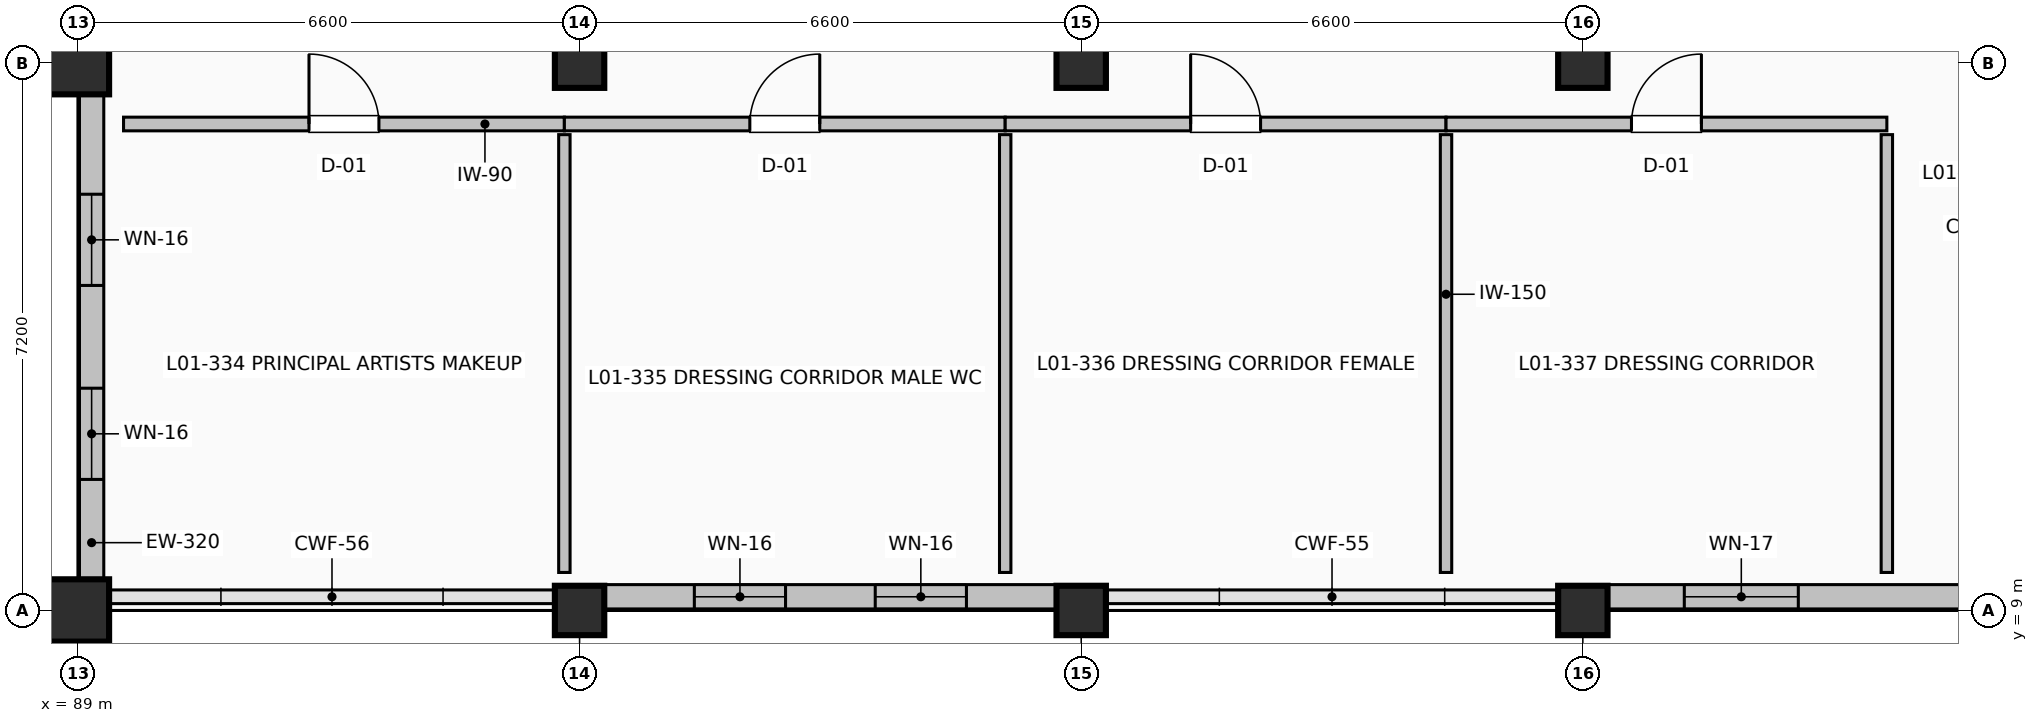
"""IFC4 building model, lengths in metres.
Left out: names, types, materials, properties, quantities, classifications, styles, units other than length and angle.
Written with IfcOpenShell. Run it as: python <this file> out.ifc"""

import sys

from ifc_helpers import new_model, si_unit, direction, frame, frame_2d, origin, origin_2d, place, context, subcontext, project, spatial, rectangle, extrude, element, fill, save


model = new_model("IFC4")
c1 = context("Model", 3, precision=1e-05, world=origin(), true_north=direction((0.0, 1.0)))
c2 = subcontext(c1, "Body", "Model", "MODEL_VIEW")
j1 = project(units=[si_unit("LENGTHUNIT", "METRE"), si_unit("PLANEANGLEUNIT", "RADIAN")], contexts=[c1])
p1 = place(None, origin())
s1 = spatial("IfcSite", under=j1, at=p1, CompositionType="ELEMENT")
p2 = place(p1, origin())
s2 = spatial("IfcBuilding", under=s1, at=p2, CompositionType="ELEMENT")
p3 = place(p2, frame((0.0, 0.0, 5.4)))
s3 = spatial("IfcBuildingStorey", under=s2, at=p3, CompositionType="ELEMENT", Elevation=5.4)
for number, where, z_axis, x_axis in (
    (1, (89.0, 9.0, 0.0), (0.0, 0.0, 1.0), (1.0, 0.0, 0.0)),
    (2, (89.0, 16.2, 0.0), (0.0, 0.0, 1.0), (1.0, 0.0, 0.0)),
):
    element("IfcColumn", number, at=place(p3, frame(where, z_axis=z_axis, x_axis=x_axis)), inside=s3, PredefinedType="COLUMN", context=c2, shape_type="SweptSolid", body=[
        extrude(rectangle(XDim=0.82, YDim=0.82, at=origin_2d()), origin(), (0.0, 0.0, 1.0), 4.8),
    ])
for number, where, z_axis, x_axis in (
    (3, (95.6, 9.0, 0.0), (0.0, 0.0, 1.0), (1.0, 0.0, 0.0)),
    (4, (95.6, 16.2, 0.0), (0.0, 0.0, 1.0), (1.0, 0.0, 0.0)),
    (5, (102.2, 9.0, 0.0), (0.0, 0.0, 1.0), (1.0, 0.0, 0.0)),
    (6, (102.2, 16.2, 0.0), (0.0, 0.0, 1.0), (1.0, 0.0, 0.0)),
    (7, (108.8, 9.0, 0.0), (0.0, 0.0, 1.0), (1.0, 0.0, 0.0)),
    (8, (108.8, 16.2, 0.0), (0.0, 0.0, 1.0), (1.0, 0.0, 0.0)),
):
    element("IfcColumn", number, at=place(p3, frame(where, z_axis=z_axis, x_axis=x_axis)), inside=s3, PredefinedType="COLUMN", context=c2, shape_type="SweptSolid", body=[
        extrude(rectangle(XDim=0.65, YDim=0.65, at=origin_2d()), origin(), (0.0, 0.0, 1.0), 4.8),
    ])
p4 = place(p3, frame((89.18, 9.41, 0.0), z_axis=(0.0, 0.0, 1.0), x_axis=(0.0, 1.0, 0.0)))
e9 = element("IfcWall", 9, at=p4, inside=s3, PredefinedType="SOLIDWALL", context=c2, shape_type="SweptSolid", body=[
    extrude(rectangle(XDim=6.38, YDim=0.32, at=frame_2d((3.19, 0.0))), origin(), (0.0, 0.0, 1.0), 3.742),
])
p5 = place(p4, frame((1.314, 0.0, 1.0)))
e10 = element("IfcOpeningElement", 10, at=p5, cuts=e9, PredefinedType="OPENING", context=c2, shape_type="SweptSolid", body=[
    extrude(rectangle(XDim=1.2, YDim=1.7, at=frame_2d((0.6, 0.85))), frame((0.0, 0.17, 0.0), z_axis=(0.0, -1.0, 0.0), x_axis=(1.0, 0.0, 0.0)), (0.0, 0.0, 1.0), 0.34),
])
p6 = place(p4, frame((3.866, 0.0, 1.0)))
e11 = element("IfcOpeningElement", 11, at=p6, cuts=e9, PredefinedType="OPENING", context=c2, shape_type="SweptSolid", body=[
    extrude(rectangle(XDim=1.2, YDim=1.7, at=frame_2d((0.6, 0.85))), frame((0.0, 0.17, 0.0), z_axis=(0.0, -1.0, 0.0), x_axis=(1.0, 0.0, 0.0)), (0.0, 0.0, 1.0), 0.34),
])
p7 = place(p3, frame((114.99, 9.18, 0.0), z_axis=(0.0, 0.0, 1.0), x_axis=(-1.0, 0.0, 0.0)))
e12 = element("IfcWall", 12, at=p7, inside=s3, PredefinedType="SOLIDWALL", context=c2, shape_type="SweptSolid", body=[
    extrude(rectangle(XDim=5.865, YDim=0.32, at=frame_2d((2.933, 0.0))), origin(), (0.0, 0.0, 1.0), 3.742),
])
p8 = place(p7, frame((3.355, 0.0, 1.0)))
e13 = element("IfcOpeningElement", 13, at=p8, cuts=e12, PredefinedType="OPENING", context=c2, shape_type="SweptSolid", body=[
    extrude(rectangle(XDim=1.5, YDim=1.7, at=frame_2d((0.75, 0.85))), frame((0.0, 0.17, 0.0), z_axis=(0.0, -1.0, 0.0), x_axis=(1.0, 0.0, 0.0)), (0.0, 0.0, 1.0), 0.34),
])
p9 = place(p3, frame((101.875, 9.18, 0.0), z_axis=(0.0, 0.0, 1.0), x_axis=(-1.0, 0.0, 0.0)))
e14 = element("IfcWall", 14, at=p9, inside=s3, PredefinedType="SOLIDWALL", context=c2, shape_type="SweptSolid", body=[
    extrude(rectangle(XDim=5.95, YDim=0.32, at=frame_2d((2.975, 0.0))), origin(), (0.0, 0.0, 1.0), 3.742),
])
p10 = place(p9, frame((1.185, 0.0, 1.0)))
e15 = element("IfcOpeningElement", 15, at=p10, cuts=e14, PredefinedType="OPENING", context=c2, shape_type="SweptSolid", body=[
    extrude(rectangle(XDim=1.2, YDim=1.7, at=frame_2d((0.6, 0.85))), frame((0.0, 0.17, 0.0), z_axis=(0.0, -1.0, 0.0), x_axis=(1.0, 0.0, 0.0)), (0.0, 0.0, 1.0), 0.34),
])
p11 = place(p9, frame((3.565, 0.0, 1.0)))
e16 = element("IfcOpeningElement", 16, at=p11, cuts=e14, PredefinedType="OPENING", context=c2, shape_type="SweptSolid", body=[
    extrude(rectangle(XDim=1.2, YDim=1.7, at=frame_2d((0.6, 0.85))), frame((0.0, 0.17, 0.0), z_axis=(0.0, -1.0, 0.0), x_axis=(1.0, 0.0, 0.0)), (0.0, 0.0, 1.0), 0.34),
])
p12 = place(p3, frame((89.6, 15.4, 0.0), z_axis=(0.0, 0.0, 1.0), x_axis=(1.0, 0.0, 0.0)))
e17 = element("IfcWall", 17, at=p12, inside=s3, PredefinedType="PARTITIONING", context=c2, shape_type="SweptSolid", body=[
    extrude(rectangle(XDim=5.8, YDim=0.18, at=frame_2d((2.9, 0.0))), origin(), (0.0, 0.0, 1.0), 4.492),
])
p13 = place(p12, frame((2.44, 0.0, 0.0)))
e18 = element("IfcOpeningElement", 18, at=p13, cuts=e17, PredefinedType="OPENING", context=c2, shape_type="SweptSolid", body=[
    extrude(rectangle(XDim=0.92, YDim=2.05, at=frame_2d((0.46, 1.025))), frame((0.0, 0.1, 0.0), z_axis=(0.0, -1.0, 0.0), x_axis=(1.0, 0.0, 0.0)), (0.0, 0.0, 1.0), 0.2),
])
p14 = place(p3, frame((95.4, 9.5, 0.0), z_axis=(0.0, 0.0, 1.0), x_axis=(0.0, 1.0, 0.0)))
e19 = element("IfcWall", 19, at=p14, inside=s3, PredefinedType="PARTITIONING", context=c2, shape_type="SweptSolid", body=[
    extrude(rectangle(XDim=5.76, YDim=0.15, at=frame_2d((2.88, 0.0))), origin(), (0.0, 0.0, 1.0), 3.742),
])
p15 = place(p3, frame((95.4, 15.4, 0.0), z_axis=(0.0, 0.0, 1.0), x_axis=(1.0, 0.0, 0.0)))
e20 = element("IfcWall", 20, at=p15, inside=s3, PredefinedType="PARTITIONING", context=c2, shape_type="SweptSolid", body=[
    extrude(rectangle(XDim=5.8, YDim=0.18, at=frame_2d((2.9, 0.0))), origin(), (0.0, 0.0, 1.0), 4.492),
])
p16 = place(p15, frame((2.44, 0.0, 0.0)))
e21 = element("IfcOpeningElement", 21, at=p16, cuts=e20, PredefinedType="OPENING", context=c2, shape_type="SweptSolid", body=[
    extrude(rectangle(XDim=0.92, YDim=2.05, at=frame_2d((0.46, 1.025))), frame((0.0, 0.1, 0.0), z_axis=(0.0, -1.0, 0.0), x_axis=(1.0, 0.0, 0.0)), (0.0, 0.0, 1.0), 0.2),
])
p17 = place(p3, frame((101.2, 9.5, 0.0), z_axis=(0.0, 0.0, 1.0), x_axis=(0.0, 1.0, 0.0)))
e22 = element("IfcWall", 22, at=p17, inside=s3, PredefinedType="PARTITIONING", context=c2, shape_type="SweptSolid", body=[
    extrude(rectangle(XDim=5.76, YDim=0.15, at=frame_2d((2.88, 0.0))), origin(), (0.0, 0.0, 1.0), 4.492),
])
p18 = place(p3, frame((101.2, 15.4, 0.0), z_axis=(0.0, 0.0, 1.0), x_axis=(1.0, 0.0, 0.0)))
e23 = element("IfcWall", 23, at=p18, inside=s3, PredefinedType="PARTITIONING", context=c2, shape_type="SweptSolid", body=[
    extrude(rectangle(XDim=5.8, YDim=0.18, at=frame_2d((2.9, 0.0))), origin(), (0.0, 0.0, 1.0), 4.492),
])
p19 = place(p18, frame((2.44, 0.0, 0.0)))
e24 = element("IfcOpeningElement", 24, at=p19, cuts=e23, PredefinedType="OPENING", context=c2, shape_type="SweptSolid", body=[
    extrude(rectangle(XDim=0.92, YDim=2.05, at=frame_2d((0.46, 1.025))), frame((0.0, 0.1, 0.0), z_axis=(0.0, -1.0, 0.0), x_axis=(1.0, 0.0, 0.0)), (0.0, 0.0, 1.0), 0.2),
])
for number, where, z_axis, x_axis in (
    (25, (107.0, 9.5, 0.0), (0.0, 0.0, 1.0), (0.0, 1.0, 0.0)),
    (26, (112.8, 9.5, 0.0), (0.0, 0.0, 1.0), (0.0, 1.0, 0.0)),
):
    element("IfcWall", number, at=place(p3, frame(where, z_axis=z_axis, x_axis=x_axis)), inside=s3, PredefinedType="PARTITIONING", context=c2, shape_type="SweptSolid", body=[
        extrude(rectangle(XDim=5.76, YDim=0.15, at=frame_2d((2.88, 0.0))), origin(), (0.0, 0.0, 1.0), 4.492),
    ])
p20 = place(p3, frame((107.0, 15.4, 0.0), z_axis=(0.0, 0.0, 1.0), x_axis=(1.0, 0.0, 0.0)))
e27 = element("IfcWall", 27, at=p20, inside=s3, PredefinedType="PARTITIONING", context=c2, shape_type="SweptSolid", body=[
    extrude(rectangle(XDim=5.8, YDim=0.18, at=frame_2d((2.9, 0.0))), origin(), (0.0, 0.0, 1.0), 4.492),
])
p21 = place(p20, frame((2.44, 0.0, 0.0)))
e28 = element("IfcOpeningElement", 28, at=p21, cuts=e27, PredefinedType="OPENING", context=c2, shape_type="SweptSolid", body=[
    extrude(rectangle(XDim=0.92, YDim=2.05, at=frame_2d((0.46, 1.025))), frame((0.0, 0.1, 0.0), z_axis=(0.0, -1.0, 0.0), x_axis=(1.0, 0.0, 0.0)), (0.0, 0.0, 1.0), 0.2),
])
p22 = place(p5, origin())
e29 = element("IfcWindow", 29, at=p22, inside=s3, PartitioningType="SINGLE_PANEL", PredefinedType="WINDOW", context=c2, shape_type="SweptSolid", body=[
    extrude(rectangle(XDim=1.2, YDim=1.7, at=frame_2d((0.6, 0.85))), frame((0.0, 0.03, 0.0), z_axis=(0.0, -1.0, 0.0), x_axis=(1.0, 0.0, 0.0)), (0.0, 0.0, 1.0), 0.06),
])
fill(e10, e29)
p23 = place(p6, origin())
e30 = element("IfcWindow", 30, at=p23, inside=s3, PartitioningType="SINGLE_PANEL", PredefinedType="WINDOW", context=c2, shape_type="SweptSolid", body=[
    extrude(rectangle(XDim=1.2, YDim=1.7, at=frame_2d((0.6, 0.85))), frame((0.0, 0.03, 0.0), z_axis=(0.0, -1.0, 0.0), x_axis=(1.0, 0.0, 0.0)), (0.0, 0.0, 1.0), 0.06),
])
fill(e11, e30)
p24 = place(p8, origin())
e31 = element("IfcWindow", 31, at=p24, inside=s3, PartitioningType="SINGLE_PANEL", PredefinedType="WINDOW", context=c2, shape_type="SweptSolid", body=[
    extrude(rectangle(XDim=1.5, YDim=1.7, at=frame_2d((0.75, 0.85))), frame((0.0, 0.03, 0.0), z_axis=(0.0, -1.0, 0.0), x_axis=(1.0, 0.0, 0.0)), (0.0, 0.0, 1.0), 0.06),
])
fill(e13, e31)
p25 = place(p10, origin())
e32 = element("IfcWindow", 32, at=p25, inside=s3, PartitioningType="SINGLE_PANEL", PredefinedType="WINDOW", context=c2, shape_type="SweptSolid", body=[
    extrude(rectangle(XDim=1.2, YDim=1.7, at=frame_2d((0.6, 0.85))), frame((0.0, 0.03, 0.0), z_axis=(0.0, -1.0, 0.0), x_axis=(1.0, 0.0, 0.0)), (0.0, 0.0, 1.0), 0.06),
])
fill(e15, e32)
p26 = place(p11, origin())
e33 = element("IfcWindow", 33, at=p26, inside=s3, PartitioningType="SINGLE_PANEL", PredefinedType="WINDOW", context=c2, shape_type="SweptSolid", body=[
    extrude(rectangle(XDim=1.2, YDim=1.7, at=frame_2d((0.6, 0.85))), frame((0.0, 0.03, 0.0), z_axis=(0.0, -1.0, 0.0), x_axis=(1.0, 0.0, 0.0)), (0.0, 0.0, 1.0), 0.06),
])
fill(e16, e33)
p27 = place(p13, origin())
e34 = element("IfcDoor", 34, at=p27, inside=s3, OperationType="SINGLE_SWING_LEFT", PredefinedType="DOOR", context=c2, shape_type="SweptSolid", body=[
    extrude(rectangle(XDim=0.92, YDim=2.05, at=frame_2d((0.46, 1.025))), frame((0.0, 0.025, 0.0), z_axis=(0.0, -1.0, 0.0), x_axis=(1.0, 0.0, 0.0)), (0.0, 0.0, 1.0), 0.05),
])
fill(e18, e34)
p28 = place(p16, origin())
e35 = element("IfcDoor", 35, at=p28, inside=s3, OperationType="SINGLE_SWING_RIGHT", PredefinedType="DOOR", context=c2, shape_type="SweptSolid", body=[
    extrude(rectangle(XDim=0.92, YDim=2.05, at=frame_2d((0.46, 1.025))), frame((0.0, 0.025, 0.0), z_axis=(0.0, -1.0, 0.0), x_axis=(1.0, 0.0, 0.0)), (0.0, 0.0, 1.0), 0.05),
])
fill(e21, e35)
p29 = place(p19, origin())
e36 = element("IfcDoor", 36, at=p29, inside=s3, OperationType="SINGLE_SWING_LEFT", PredefinedType="DOOR", context=c2, shape_type="SweptSolid", body=[
    extrude(rectangle(XDim=0.92, YDim=2.05, at=frame_2d((0.46, 1.025))), frame((0.0, 0.025, 0.0), z_axis=(0.0, -1.0, 0.0), x_axis=(1.0, 0.0, 0.0)), (0.0, 0.0, 1.0), 0.05),
])
fill(e24, e36)
p30 = place(p21, origin())
e37 = element("IfcDoor", 37, at=p30, inside=s3, OperationType="SINGLE_SWING_RIGHT", PredefinedType="DOOR", context=c2, shape_type="SweptSolid", body=[
    extrude(rectangle(XDim=0.92, YDim=2.05, at=frame_2d((0.46, 1.025))), frame((0.0, 0.025, 0.0), z_axis=(0.0, -1.0, 0.0), x_axis=(1.0, 0.0, 0.0)), (0.0, 0.0, 1.0), 0.05),
])
fill(e28, e37)
save(model, sys.argv[1])
